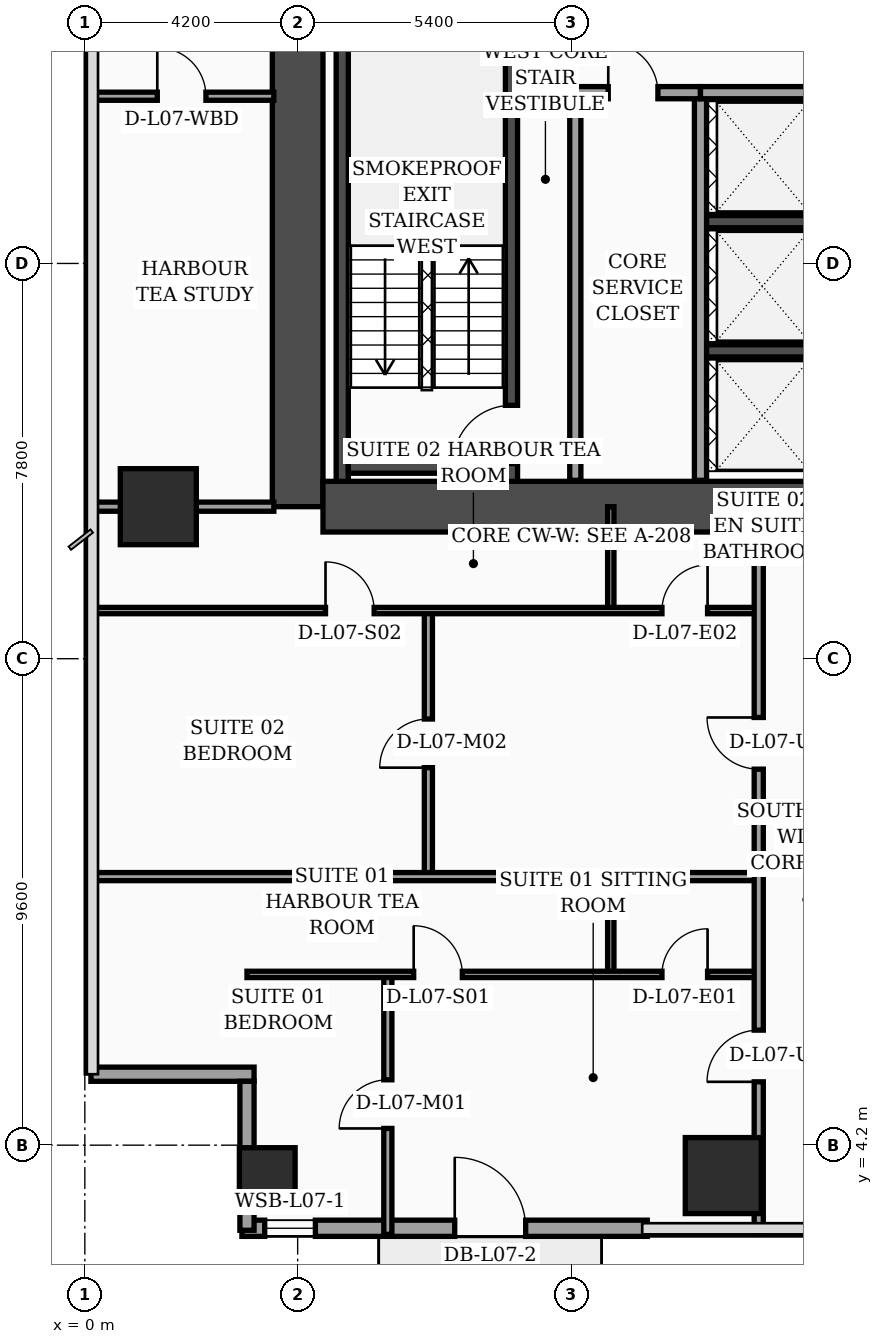
"""IFC4 building model, lengths in metres.
Left out: names, types, materials, properties, quantities, classifications, styles, units other than length and angle.
Written with IfcOpenShell. Run it as: python <this file> out.ifc"""

import sys

from ifc_helpers import new_model, si_unit, direction, frame, frame_2d, origin, origin_2d, place, context, subcontext, project, spatial, rectangle, hollow_rectangle, extrude, element, fill, save


model = new_model("IFC4")
c1 = context("Model", 3, precision=1e-05, world=origin(), true_north=direction((0.0, 1.0)))
c2 = subcontext(c1, "Body", "Model", "MODEL_VIEW")
j1 = project(units=[si_unit("LENGTHUNIT", "METRE"), si_unit("PLANEANGLEUNIT", "RADIAN")], contexts=[c1])
p1 = place(None, origin())
s1 = spatial("IfcSite", under=j1, at=p1, CompositionType="ELEMENT")
p2 = place(p1, origin())
s2 = spatial("IfcBuilding", under=s1, at=p2, CompositionType="ELEMENT")
p3 = place(p2, frame((0.0, 0.0, 34.6)))
s3 = spatial("IfcBuildingStorey", under=s2, at=p3, CompositionType="ELEMENT", Elevation=34.6)
p4 = place(p3, frame((4.2, 16.8, 0.0), z_axis=(0.0, 0.0, 1.0), x_axis=(0.0, 1.0, 0.0)))
e1 = element("IfcWall", 1, at=p4, inside=s3, PredefinedType="SHEAR", context=c2, shape_type="SweptSolid", body=[
    extrude(rectangle(XDim=21.6, YDim=1.0, at=frame_2d((10.8, 0.0))), origin(), (0.0, 0.0, 1.0), 3.56),
])
p5 = place(p3, frame((4.7, 16.8, 0.0), z_axis=(0.0, 0.0, 1.0), x_axis=(1.0, 0.0, 0.0)))
e2 = element("IfcWall", 2, at=p5, inside=s3, PredefinedType="SHEAR", context=c2, shape_type="SweptSolid", body=[
    extrude(rectangle(XDim=9.8, YDim=1.0, at=frame_2d((4.9, 0.0))), origin(), (0.0, 0.0, 1.0), 3.56),
])
p6 = place(p3, frame((5.08, 17.3, 0.0), z_axis=(0.0, 0.0, 1.0), x_axis=(0.0, 1.0, 0.0)))
e3 = element("IfcWall", 3, at=p6, inside=s3, PredefinedType="SOLIDWALL", context=c2, shape_type="SweptSolid", body=[
    extrude(rectangle(XDim=9.49, YDim=0.24, at=frame_2d((4.745, 0.0))), origin(), (0.0, 0.0, 1.0), 3.56),
])
p7 = place(p3, frame((8.42, 17.3, 0.0), z_axis=(0.0, 0.0, 1.0), x_axis=(0.0, 1.0, 0.0)))
e4 = element("IfcWall", 4, at=p7, inside=s3, PredefinedType="SOLIDWALL", context=c2, shape_type="SweptSolid", body=[
    extrude(rectangle(XDim=9.49, YDim=0.24, at=frame_2d((4.745, 0.0))), origin(), (0.0, 0.0, 1.0), 3.56),
])
p8 = place(p7, frame((0.35, 0.0, 0.0)))
e5 = element("IfcOpeningElement", 5, at=p8, cuts=e4, PredefinedType="OPENING", context=c2, shape_type="SweptSolid", body=[
    extrude(rectangle(XDim=1.15, YDim=2.2, at=frame_2d((0.575, 1.1))), frame((0.0, 0.13, 0.0), z_axis=(0.0, -1.0, 0.0), x_axis=(1.0, 0.0, 0.0)), (0.0, 0.0, 1.0), 0.26),
])
p9 = place(p3, frame((5.2, 17.58, 0.0), z_axis=(0.0, 0.0, 1.0), x_axis=(1.0, 0.0, 0.0)))
e6 = element("IfcWall", 6, at=p9, inside=s3, PredefinedType="SOLIDWALL", context=c2, shape_type="SweptSolid", body=[
    extrude(rectangle(XDim=3.1, YDim=0.24, at=frame_2d((1.55, 0.0))), origin(), (0.0, 0.0, 1.0), 3.56),
])
for number, where, z_axis, x_axis in (
    (7, (12.18, 19.875, 0.0), (0.0, 0.0, 1.0), (1.0, 0.0, 0.0)),
    (8, (12.18, 22.425, 0.0), (0.0, 0.0, 1.0), (1.0, 0.0, 0.0)),
):
    element("IfcWall", number, at=place(p3, frame(where, z_axis=z_axis, x_axis=x_axis)), inside=s3, PredefinedType="SOLIDWALL", context=c2, shape_type="SweptSolid", body=[
        extrude(rectangle(XDim=2.32, YDim=0.24, at=frame_2d((1.16, 0.0))), origin(), (0.0, 0.0, 1.0), 3.56),
    ])
p10 = place(p3, frame((3.6, 3.6, 0.0), z_axis=(0.0, 0.0, 1.0), x_axis=(1.0, 0.0, 0.0)))
e9 = element("IfcColumn", 9, at=p10, inside=s3, PredefinedType="COLUMN", context=c2, shape_type="SweptSolid", body=[
    extrude(hollow_rectangle(XDim=1.1, YDim=1.1, WallThickness=0.045, at=origin_2d()), origin(), (0.0, 0.0, 1.0), 3.56),
])
for number, where, z_axis, x_axis in (
    (10, (1.45, 16.8, 0.0), (0.0, 0.0, 1.0), (1.0, 0.0, 0.0)),
    (11, (12.6, 3.6, 0.0), (0.0, 0.0, 1.0), (1.0, 0.0, 0.0)),
):
    element("IfcColumn", number, at=place(p3, frame(where, z_axis=z_axis, x_axis=x_axis)), inside=s3, PredefinedType="COLUMN", context=c2, shape_type="SweptSolid", body=[
        extrude(rectangle(XDim=1.5, YDim=1.5, at=origin_2d()), origin(), (0.0, 0.0, 1.0), 3.56),
    ])
p11 = place(p3, frame((3.1, 2.56, 0.0), z_axis=(0.0, 0.0, 1.0), x_axis=(1.0, 0.0, 0.0)))
e12 = element("IfcWall", 12, at=p11, inside=s3, PredefinedType="SOLIDWALL", context=c2, shape_type="SweptSolid", body=[
    extrude(rectangle(XDim=8.0, YDim=0.32, at=frame_2d((4.0, 0.0))), origin(), (0.0, 0.0, 1.0), 3.56),
])
p12 = place(p11, frame((0.45, 0.0, 0.75)))
e13 = element("IfcOpeningElement", 13, at=p12, cuts=e12, PredefinedType="OPENING", context=c2, shape_type="SweptSolid", body=[
    extrude(rectangle(XDim=1.0, YDim=1.6, at=frame_2d((0.5, 0.8))), frame((0.0, 0.17, 0.0), z_axis=(0.0, -1.0, 0.0), x_axis=(1.0, 0.0, 0.0)), (0.0, 0.0, 1.0), 0.34),
])
p13 = place(p11, frame((4.2, 0.0, 0.0)))
e14 = element("IfcOpeningElement", 14, at=p13, cuts=e12, PredefinedType="OPENING", context=c2, shape_type="SweptSolid", body=[
    extrude(rectangle(XDim=1.4, YDim=2.25, at=frame_2d((0.7, 1.125))), frame((0.0, 0.17, 0.0), z_axis=(0.0, -1.0, 0.0), x_axis=(1.0, 0.0, 0.0)), (0.0, 0.0, 1.0), 0.34),
])
p14 = place(p3, frame((0.12, 5.6, 0.0), z_axis=(0.0, 0.0, 1.0), x_axis=(1.0, 0.0, 0.0)))
e15 = element("IfcWall", 15, at=p14, inside=s3, PredefinedType="SOLIDWALL", context=c2, shape_type="SweptSolid", body=[
    extrude(rectangle(XDim=3.22, YDim=0.28, at=frame_2d((1.61, 0.0))), origin(), (0.0, 0.0, 1.0), 2.84),
])
p15 = place(p3, frame((3.2, 5.46, 0.0), z_axis=(0.0, 0.0, 1.0), x_axis=(0.0, -1.0, 0.0)))
e16 = element("IfcWall", 16, at=p15, inside=s3, PredefinedType="SOLIDWALL", context=c2, shape_type="SweptSolid", body=[
    extrude(rectangle(XDim=2.94, YDim=0.28, at=frame_2d((1.47, 0.0))), origin(), (0.0, 0.0, 1.0), 2.84),
])
p16 = place(p3, frame((9.68, 17.32, 0.0), z_axis=(0.0, 0.0, 1.0), x_axis=(0.0, 1.0, 0.0)))
e17 = element("IfcWall", 17, at=p16, inside=s3, PredefinedType="SOLIDWALL", context=c2, shape_type="SweptSolid", body=[
    extrude(rectangle(XDim=7.68, YDim=0.22, at=frame_2d((3.84, 0.0))), origin(), (0.0, 0.0, 1.0), 3.56),
])
p17 = place(p3, frame((12.15, 17.32, 0.0), z_axis=(0.0, 0.0, 1.0), x_axis=(0.0, 1.0, 0.0)))
e18 = element("IfcWall", 18, at=p17, inside=s3, PredefinedType="SOLIDWALL", context=c2, shape_type="SweptSolid", body=[
    extrude(rectangle(XDim=7.65, YDim=0.24, at=frame_2d((3.825, 0.0))), origin(), (0.0, 0.0, 1.0), 3.56),
])
p18 = place(p3, frame((9.68, 24.97, 0.0), z_axis=(0.0, 0.0, 1.0), x_axis=(1.0, 0.0, 0.0)))
e19 = element("IfcWall", 19, at=p18, inside=s3, PredefinedType="SOLIDWALL", context=c2, shape_type="SweptSolid", body=[
    extrude(rectangle(XDim=2.47, YDim=0.24, at=frame_2d((1.235, 0.0))), origin(), (0.0, 0.0, 1.0), 3.56),
])
p19 = place(p18, frame((0.65, 0.0, 0.0)))
e20 = element("IfcOpeningElement", 20, at=p19, cuts=e19, PredefinedType="OPENING", context=c2, shape_type="SweptSolid", body=[
    extrude(rectangle(XDim=0.98, YDim=2.15, at=frame_2d((0.49, 1.075))), frame((0.0, 0.13, 0.0), z_axis=(0.0, -1.0, 0.0), x_axis=(1.0, 0.0, 0.0)), (0.0, 0.0, 1.0), 0.26),
])
p20 = place(p3, frame((12.15, 24.97, 0.0), z_axis=(0.0, 0.0, 1.0), x_axis=(1.0, 0.0, 0.0)))
e21 = element("IfcWall", 21, at=p20, inside=s3, PredefinedType="SOLIDWALL", context=c2, shape_type="SweptSolid", body=[
    extrude(rectangle(XDim=2.33, YDim=0.24, at=frame_2d((1.165, 0.0))), origin(), (0.0, 0.0, 1.0), 2.84),
])
p21 = place(p3, frame((0.08, 24.9, 0.0), z_axis=(0.0, 0.0, 1.0), x_axis=(1.0, 0.0, 0.0)))
e22 = element("IfcWall", 22, at=p21, inside=s3, PredefinedType="PARTITIONING", context=c2, shape_type="SweptSolid", body=[
    extrude(rectangle(XDim=3.65, YDim=0.16, at=frame_2d((1.825, 0.0))), origin(), (0.0, 0.0, 1.0), 3.04),
])
p22 = place(p21, frame((1.35, 0.0, 0.0)))
e23 = element("IfcOpeningElement", 23, at=p22, cuts=e22, PredefinedType="OPENING", context=c2, shape_type="SweptSolid", body=[
    extrude(rectangle(XDim=0.96, YDim=2.2, at=frame_2d((0.48, 1.1))), frame((0.0, 0.09, 0.0), z_axis=(0.0, -1.0, 0.0), x_axis=(1.0, 0.0, 0.0)), (0.0, 0.0, 1.0), 0.18),
])
p23 = place(p3, frame((0.08, 16.8, 0.0), z_axis=(0.0, 0.0, 1.0), x_axis=(1.0, 0.0, 0.0)))
e24 = element("IfcWall", 24, at=p23, inside=s3, PredefinedType="PARTITIONING", context=c2, shape_type="SweptSolid", body=[
    extrude(rectangle(XDim=3.65, YDim=0.18, at=frame_2d((1.825, 0.0))), origin(), (0.0, 0.0, 1.0), 2.84),
])
p24 = place(p3, frame((10.38, 7.57, 0.0), z_axis=(0.0, 0.0, 1.0), x_axis=(0.0, 1.0, 0.0)))
e25 = element("IfcWall", 25, at=p24, inside=s3, PredefinedType="PARTITIONING", context=c2, shape_type="SweptSolid", body=[
    extrude(rectangle(XDim=1.93, YDim=0.125, at=frame_2d((0.965, 0.0))), origin(), (0.0, 0.0, 1.0), 3.09),
])
p25 = place(p3, frame((5.98, 2.44, 0.0), z_axis=(0.0, 0.0, 1.0), x_axis=(0.0, 1.0, 0.0)))
e26 = element("IfcWall", 26, at=p25, inside=s3, PredefinedType="PARTITIONING", context=c2, shape_type="SweptSolid", body=[
    extrude(rectangle(XDim=5.13, YDim=0.16, at=frame_2d((2.565, 0.0))), origin(), (0.0, 0.0, 1.0), 3.04),
])
p26 = place(p25, frame((2.09, 0.0, 0.0)))
e27 = element("IfcOpeningElement", 27, at=p26, cuts=e26, PredefinedType="OPENING", context=c2, shape_type="SweptSolid", body=[
    extrude(rectangle(XDim=0.96, YDim=2.2, at=frame_2d((0.48, 1.1))), frame((0.0, 0.09, 0.0), z_axis=(0.0, -1.0, 0.0), x_axis=(1.0, 0.0, 0.0)), (0.0, 0.0, 1.0), 0.18),
])
p27 = place(p3, frame((3.2, 7.57, 0.0), z_axis=(0.0, 0.0, 1.0), x_axis=(1.0, 0.0, 0.0)))
e28 = element("IfcWall", 28, at=p27, inside=s3, PredefinedType="PARTITIONING", context=c2, shape_type="SweptSolid", body=[
    extrude(rectangle(XDim=10.1, YDim=0.125, at=frame_2d((5.05, 0.0))), origin(), (0.0, 0.0, 1.0), 2.84),
])
p28 = place(p27, frame((3.29, 0.0, 0.0)))
e29 = element("IfcOpeningElement", 29, at=p28, cuts=e28, PredefinedType="OPENING", context=c2, shape_type="SweptSolid", body=[
    extrude(rectangle(XDim=0.96, YDim=2.2, at=frame_2d((0.48, 1.1))), frame((0.0, 0.073, 0.0), z_axis=(0.0, -1.0, 0.0), x_axis=(1.0, 0.0, 0.0)), (0.0, 0.0, 1.0), 0.145),
])
p29 = place(p27, frame((8.19, 0.0, 0.0)))
e30 = element("IfcOpeningElement", 30, at=p29, cuts=e28, PredefinedType="OPENING", context=c2, shape_type="SweptSolid", body=[
    extrude(rectangle(XDim=0.9, YDim=2.15, at=frame_2d((0.45, 1.075))), frame((0.0, 0.073, 0.0), z_axis=(0.0, -1.0, 0.0), x_axis=(1.0, 0.0, 0.0)), (0.0, 0.0, 1.0), 0.145),
])
p30 = place(p3, frame((10.38, 14.75, 0.0), z_axis=(0.0, 0.0, 1.0), x_axis=(0.0, 1.0, 0.0)))
e31 = element("IfcWall", 31, at=p30, inside=s3, PredefinedType="PARTITIONING", context=c2, shape_type="SweptSolid", body=[
    extrude(rectangle(XDim=2.05, YDim=0.125, at=frame_2d((1.025, 0.0))), origin(), (0.0, 0.0, 1.0), 3.56),
])
p31 = place(p3, frame((6.78, 9.5, 0.0), z_axis=(0.0, 0.0, 1.0), x_axis=(0.0, 1.0, 0.0)))
e32 = element("IfcWall", 32, at=p31, inside=s3, PredefinedType="PARTITIONING", context=c2, shape_type="SweptSolid", body=[
    extrude(rectangle(XDim=5.25, YDim=0.16, at=frame_2d((2.625, 0.0))), origin(), (0.0, 0.0, 1.0), 3.14),
])
p32 = place(p31, frame((2.15, 0.0, 0.0)))
e33 = element("IfcOpeningElement", 33, at=p32, cuts=e32, PredefinedType="OPENING", context=c2, shape_type="SweptSolid", body=[
    extrude(rectangle(XDim=0.96, YDim=2.2, at=frame_2d((0.48, 1.1))), frame((0.0, 0.09, 0.0), z_axis=(0.0, -1.0, 0.0), x_axis=(1.0, 0.0, 0.0)), (0.0, 0.0, 1.0), 0.18),
])
p33 = place(p3, frame((0.08, 14.75, 0.0), z_axis=(0.0, 0.0, 1.0), x_axis=(1.0, 0.0, 0.0)))
e34 = element("IfcWall", 34, at=p33, inside=s3, PredefinedType="PARTITIONING", context=c2, shape_type="SweptSolid", body=[
    extrude(rectangle(XDim=13.22, YDim=0.125, at=frame_2d((6.61, 0.0))), origin(), (0.0, 0.0, 1.0), 2.84),
])
p34 = place(p33, frame((4.67, 0.0, 0.0)))
e35 = element("IfcOpeningElement", 35, at=p34, cuts=e34, PredefinedType="OPENING", context=c2, shape_type="SweptSolid", body=[
    extrude(rectangle(XDim=0.96, YDim=2.2, at=frame_2d((0.48, 1.1))), frame((0.0, 0.073, 0.0), z_axis=(0.0, -1.0, 0.0), x_axis=(1.0, 0.0, 0.0)), (0.0, 0.0, 1.0), 0.145),
])
p35 = place(p33, frame((11.31, 0.0, 0.0)))
e36 = element("IfcOpeningElement", 36, at=p35, cuts=e34, PredefinedType="OPENING", context=c2, shape_type="SweptSolid", body=[
    extrude(rectangle(XDim=0.9, YDim=2.15, at=frame_2d((0.45, 1.075))), frame((0.0, 0.073, 0.0), z_axis=(0.0, -1.0, 0.0), x_axis=(1.0, 0.0, 0.0)), (0.0, 0.0, 1.0), 0.145),
])
p36 = place(p3, frame((0.08, 9.5, 0.0), z_axis=(0.0, 0.0, 1.0), x_axis=(1.0, 0.0, 0.0)))
e37 = element("IfcWall", 37, at=p36, inside=s3, PredefinedType="PARTITIONING", context=c2, shape_type="SweptSolid", body=[
    extrude(rectangle(XDim=13.22, YDim=0.16, at=frame_2d((6.61, 0.0))), origin(), (0.0, 0.0, 1.0), 2.84),
])
p37 = place(p3, frame((13.3, 2.44, 0.0), z_axis=(0.0, 0.0, 1.0), x_axis=(0.0, 1.0, 0.0)))
e38 = element("IfcWall", 38, at=p37, inside=s3, PredefinedType="PARTITIONING", context=c2, shape_type="SweptSolid", body=[
    extrude(rectangle(XDim=14.36, YDim=0.18, at=frame_2d((7.18, 0.0))), origin(), (0.0, 0.0, 1.0), 3.04),
])
p38 = place(p37, frame((3.01, 0.0, 0.0)))
e39 = element("IfcOpeningElement", 39, at=p38, cuts=e38, PredefinedType="OPENING", context=c2, shape_type="SweptSolid", body=[
    extrude(rectangle(XDim=1.02, YDim=2.2, at=frame_2d((0.51, 1.1))), frame((0.0, 0.1, 0.0), z_axis=(0.0, -1.0, 0.0), x_axis=(1.0, 0.0, 0.0)), (0.0, 0.0, 1.0), 0.2),
])
p39 = place(p37, frame((9.18, 0.0, 0.0)))
e40 = element("IfcOpeningElement", 40, at=p39, cuts=e38, PredefinedType="OPENING", context=c2, shape_type="SweptSolid", body=[
    extrude(rectangle(XDim=1.02, YDim=2.2, at=frame_2d((0.51, 1.1))), frame((0.0, 0.1, 0.0), z_axis=(0.0, -1.0, 0.0), x_axis=(1.0, 0.0, 0.0)), (0.0, 0.0, 1.0), 0.2),
])
p40 = place(p12, origin())
e41 = element("IfcWindow", 41, at=p40, inside=s3, PartitioningType="SINGLE_PANEL", PredefinedType="WINDOW", context=c2, shape_type="SweptSolid", body=[
    extrude(rectangle(XDim=1.0, YDim=1.6, at=frame_2d((0.5, 0.8))), frame((0.0, 0.03, 0.0), z_axis=(0.0, -1.0, 0.0), x_axis=(1.0, 0.0, 0.0)), (0.0, 0.0, 1.0), 0.06),
])
fill(e13, e41)
p41 = place(p13, origin())
e42 = element("IfcDoor", 42, at=p41, inside=s3, OperationType="SINGLE_SWING_LEFT", PredefinedType="DOOR", context=c2, shape_type="SweptSolid", body=[
    extrude(rectangle(XDim=1.4, YDim=2.25, at=frame_2d((0.7, 1.125))), frame((0.0, 0.025, 0.0), z_axis=(0.0, -1.0, 0.0), x_axis=(1.0, 0.0, 0.0)), (0.0, 0.0, 1.0), 0.05),
])
fill(e14, e42)
p42 = place(p19, origin())
e43 = element("IfcDoor", 43, at=p42, inside=s3, OperationType="SINGLE_SWING_LEFT", PredefinedType="DOOR", context=c2, shape_type="SweptSolid", body=[
    extrude(rectangle(XDim=0.98, YDim=2.15, at=frame_2d((0.49, 1.075))), frame((0.0, 0.025, 0.0), z_axis=(0.0, -1.0, 0.0), x_axis=(1.0, 0.0, 0.0)), (0.0, 0.0, 1.0), 0.05),
])
fill(e20, e43)
p43 = place(p22, origin())
e44 = element("IfcDoor", 44, at=p43, inside=s3, OperationType="SINGLE_SWING_LEFT", PredefinedType="DOOR", context=c2, shape_type="SweptSolid", body=[
    extrude(rectangle(XDim=0.96, YDim=2.2, at=frame_2d((0.48, 1.1))), frame((0.0, 0.025, 0.0), z_axis=(0.0, -1.0, 0.0), x_axis=(1.0, 0.0, 0.0)), (0.0, 0.0, 1.0), 0.05),
])
fill(e23, e44)
p44 = place(p26, origin())
e45 = element("IfcDoor", 45, at=p44, inside=s3, OperationType="SINGLE_SWING_LEFT", PredefinedType="DOOR", context=c2, shape_type="SweptSolid", body=[
    extrude(rectangle(XDim=0.96, YDim=2.2, at=frame_2d((0.48, 1.1))), frame((0.0, 0.025, 0.0), z_axis=(0.0, -1.0, 0.0), x_axis=(1.0, 0.0, 0.0)), (0.0, 0.0, 1.0), 0.05),
])
fill(e27, e45)
p45 = place(p28, origin())
e46 = element("IfcDoor", 46, at=p45, inside=s3, OperationType="SINGLE_SWING_LEFT", PredefinedType="DOOR", context=c2, shape_type="SweptSolid", body=[
    extrude(rectangle(XDim=0.96, YDim=2.2, at=frame_2d((0.48, 1.1))), frame((0.0, 0.025, 0.0), z_axis=(0.0, -1.0, 0.0), x_axis=(1.0, 0.0, 0.0)), (0.0, 0.0, 1.0), 0.05),
])
fill(e29, e46)
p46 = place(p29, origin())
e47 = element("IfcDoor", 47, at=p46, inside=s3, OperationType="SINGLE_SWING_RIGHT", PredefinedType="DOOR", context=c2, shape_type="SweptSolid", body=[
    extrude(rectangle(XDim=0.9, YDim=2.15, at=frame_2d((0.45, 1.075))), frame((0.0, 0.025, 0.0), z_axis=(0.0, -1.0, 0.0), x_axis=(1.0, 0.0, 0.0)), (0.0, 0.0, 1.0), 0.05),
])
fill(e30, e47)
p47 = place(p32, origin())
e48 = element("IfcDoor", 48, at=p47, inside=s3, OperationType="SINGLE_SWING_LEFT", PredefinedType="DOOR", context=c2, shape_type="SweptSolid", body=[
    extrude(rectangle(XDim=0.96, YDim=2.2, at=frame_2d((0.48, 1.1))), frame((0.0, 0.025, 0.0), z_axis=(0.0, -1.0, 0.0), x_axis=(1.0, 0.0, 0.0)), (0.0, 0.0, 1.0), 0.05),
])
fill(e33, e48)
p48 = place(p34, origin())
e49 = element("IfcDoor", 49, at=p48, inside=s3, OperationType="SINGLE_SWING_LEFT", PredefinedType="DOOR", context=c2, shape_type="SweptSolid", body=[
    extrude(rectangle(XDim=0.96, YDim=2.2, at=frame_2d((0.48, 1.1))), frame((0.0, 0.025, 0.0), z_axis=(0.0, -1.0, 0.0), x_axis=(1.0, 0.0, 0.0)), (0.0, 0.0, 1.0), 0.05),
])
fill(e35, e49)
p49 = place(p35, origin())
e50 = element("IfcDoor", 50, at=p49, inside=s3, OperationType="SINGLE_SWING_RIGHT", PredefinedType="DOOR", context=c2, shape_type="SweptSolid", body=[
    extrude(rectangle(XDim=0.9, YDim=2.15, at=frame_2d((0.45, 1.075))), frame((0.0, 0.025, 0.0), z_axis=(0.0, -1.0, 0.0), x_axis=(1.0, 0.0, 0.0)), (0.0, 0.0, 1.0), 0.05),
])
fill(e36, e50)
p50 = place(p38, origin())
e51 = element("IfcDoor", 51, at=p50, inside=s3, OperationType="SINGLE_SWING_LEFT", PredefinedType="DOOR", context=c2, shape_type="SweptSolid", body=[
    extrude(rectangle(XDim=1.02, YDim=2.2, at=frame_2d((0.51, 1.1))), frame((0.0, 0.025, 0.0), z_axis=(0.0, -1.0, 0.0), x_axis=(1.0, 0.0, 0.0)), (0.0, 0.0, 1.0), 0.05),
])
fill(e39, e51)
p51 = place(p39, origin())
e52 = element("IfcDoor", 52, at=p51, inside=s3, OperationType="SINGLE_SWING_RIGHT", PredefinedType="DOOR", context=c2, shape_type="SweptSolid", body=[
    extrude(rectangle(XDim=1.02, YDim=2.2, at=frame_2d((0.51, 1.1))), frame((0.0, 0.025, 0.0), z_axis=(0.0, -1.0, 0.0), x_axis=(1.0, 0.0, 0.0)), (0.0, 0.0, 1.0), 0.05),
])
fill(e40, e52)
p52 = place(p8, origin())
e53 = element("IfcDoor", 53, at=p52, inside=s3, OperationType="SINGLE_SWING_LEFT", PredefinedType="DOOR", context=c2, shape_type="SweptSolid", body=[
    extrude(rectangle(XDim=1.15, YDim=2.2, at=frame_2d((0.575, 1.1))), frame((0.0, 0.025, 0.0), z_axis=(0.0, -1.0, 0.0), x_axis=(1.0, 0.0, 0.0)), (0.0, 0.0, 1.0), 0.05),
])
fill(e5, e53)
save(model, sys.argv[1])
